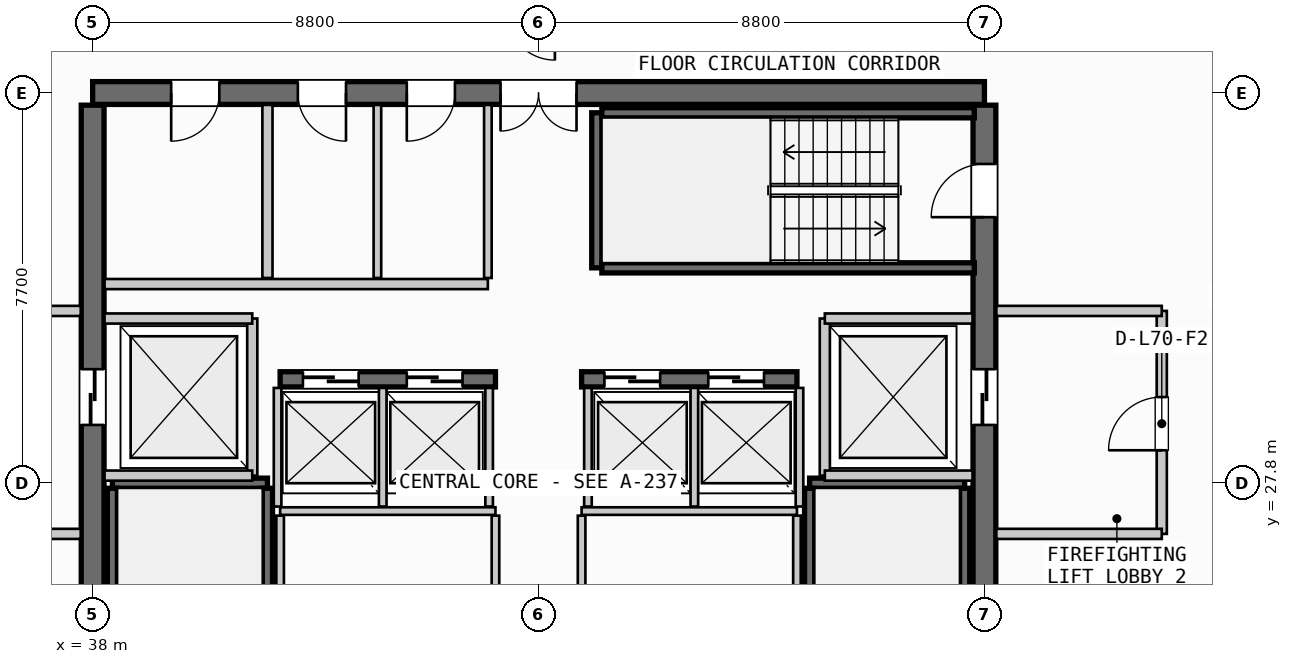
"""IFC4 building model, lengths in metres.
Left out: names, types, materials, properties, quantities, classifications, styles, units other than length and angle.
Written with IfcOpenShell. Run it as: python <this file> out.ifc"""

import sys

from ifc_helpers import new_model, si_unit, direction, frame, frame_2d, origin, place, context, subcontext, project, spatial, rectangle, extrude, source, transform, mapped, element, fill, save


model = new_model("IFC4")
c1 = context("Model", 3, precision=1e-05, world=origin(), true_north=direction((0.0, 1.0)))
c2 = subcontext(c1, "Body", "Model", "MODEL_VIEW")
j1 = project(units=[si_unit("LENGTHUNIT", "METRE"), si_unit("PLANEANGLEUNIT", "RADIAN")], contexts=[c1])
p1 = place(None, origin())
s1 = spatial("IfcSite", under=j1, at=p1, CompositionType="ELEMENT")
p2 = place(p1, origin())
s2 = spatial("IfcBuilding", under=s1, at=p2, CompositionType="ELEMENT")
p3 = place(p2, frame((0.0, 0.0, 266.35)))
s3 = spatial("IfcBuildingStorey", under=s2, at=p3, CompositionType="ELEMENT", Elevation=266.35)
p4 = place(p3, frame((55.6, 35.5, 0.0), z_axis=(0.0, 0.0, 1.0), x_axis=(-1.0, 0.0, 0.0)))
e1 = element("IfcWall", 1, at=p4, inside=s3, PredefinedType="SHEAR", context=c2, shape_type="SweptSolid", body=[
    extrude(rectangle(XDim=17.6, YDim=0.45, at=frame_2d((8.8, 0.0))), origin(), (0.0, 0.0, 1.0), 3.21),
])
p5 = place(p4, frame((8.05, 0.0, 0.0)))
e2 = element("IfcOpeningElement", 2, at=p5, cuts=e1, PredefinedType="OPENING", context=c2, shape_type="SweptSolid", body=[
    extrude(rectangle(XDim=1.5, YDim=2.2, at=frame_2d((0.75, 1.1))), frame((0.0, 0.235, 0.0), z_axis=(0.0, -1.0, 0.0), x_axis=(1.0, 0.0, 0.0)), (0.0, 0.0, 1.0), 0.47),
])
p6 = place(p4, frame((15.1, 0.0, 0.0)))
e3 = element("IfcOpeningElement", 3, at=p6, cuts=e1, PredefinedType="OPENING", context=c2, shape_type="SweptSolid", body=[
    extrude(rectangle(XDim=0.95, YDim=2.15, at=frame_2d((0.475, 1.075))), frame((0.0, 0.235, 0.0), z_axis=(0.0, -1.0, 0.0), x_axis=(1.0, 0.0, 0.0)), (0.0, 0.0, 1.0), 0.47),
])
p7 = place(p4, frame((12.6, 0.0, 0.0)))
e4 = element("IfcOpeningElement", 4, at=p7, cuts=e1, PredefinedType="OPENING", context=c2, shape_type="SweptSolid", body=[
    extrude(rectangle(XDim=0.95, YDim=2.15, at=frame_2d((0.475, 1.075))), frame((0.0, 0.235, 0.0), z_axis=(0.0, -1.0, 0.0), x_axis=(1.0, 0.0, 0.0)), (0.0, 0.0, 1.0), 0.47),
])
p8 = place(p4, frame((10.45, 0.0, 0.0)))
e5 = element("IfcOpeningElement", 5, at=p8, cuts=e1, PredefinedType="OPENING", context=c2, shape_type="SweptSolid", body=[
    extrude(rectangle(XDim=0.95, YDim=2.15, at=frame_2d((0.475, 1.075))), frame((0.0, 0.235, 0.0), z_axis=(0.0, -1.0, 0.0), x_axis=(1.0, 0.0, 0.0)), (0.0, 0.0, 1.0), 0.47),
])
p9 = place(p3, frame((38.0, 35.26, 0.0), z_axis=(0.0, 0.0, 1.0), x_axis=(0.0, -1.0, 0.0)))
e6 = element("IfcWall", 6, at=p9, inside=s3, PredefinedType="SHEAR", context=c2, shape_type="SweptSolid", body=[
    extrude(rectangle(XDim=14.92, YDim=0.45, at=frame_2d((7.46, 0.0))), origin(), (0.0, 0.0, 1.0), 3.21),
])
p10 = place(p9, frame((5.21, 0.0, 0.0)))
e7 = element("IfcOpeningElement", 7, at=p10, cuts=e6, PredefinedType="OPENING", context=c2, shape_type="SweptSolid", body=[
    extrude(rectangle(XDim=1.1, YDim=2.2, at=frame_2d((0.55, 1.1))), frame((0.0, 0.235, 0.0), z_axis=(0.0, -1.0, 0.0), x_axis=(1.0, 0.0, 0.0)), (0.0, 0.0, 1.0), 0.47),
])
p11 = place(p3, frame((55.6, 20.34, 0.0), z_axis=(0.0, 0.0, 1.0), x_axis=(0.0, 1.0, 0.0)))
e8 = element("IfcWall", 8, at=p11, inside=s3, PredefinedType="SHEAR", context=c2, shape_type="SweptSolid", body=[
    extrude(rectangle(XDim=14.92, YDim=0.45, at=frame_2d((7.46, 0.0))), origin(), (0.0, 0.0, 1.0), 3.21),
])
p12 = place(p11, frame((12.71, 0.0, 0.0)))
e9 = element("IfcOpeningElement", 9, at=p12, cuts=e8, PredefinedType="OPENING", context=c2, shape_type="SweptSolid", body=[
    extrude(rectangle(XDim=1.05, YDim=2.15, at=frame_2d((0.525, 1.075))), frame((0.0, 0.235, 0.0), z_axis=(0.0, -1.0, 0.0), x_axis=(1.0, 0.0, 0.0)), (0.0, 0.0, 1.0), 0.47),
])
p13 = place(p11, frame((8.61, 0.0, 0.0)))
e10 = element("IfcOpeningElement", 10, at=p13, cuts=e8, PredefinedType="OPENING", context=c2, shape_type="SweptSolid", body=[
    extrude(rectangle(XDim=1.1, YDim=2.2, at=frame_2d((0.55, 1.1))), frame((0.0, 0.235, 0.0), z_axis=(0.0, -1.0, 0.0), x_axis=(1.0, 0.0, 0.0)), (0.0, 0.0, 1.0), 0.47),
])
p14 = place(p3, frame((41.7, 29.85, 0.0), z_axis=(0.0, 0.0, 1.0), x_axis=(1.0, 0.0, 0.0)))
e11 = element("IfcWall", 11, at=p14, inside=s3, PredefinedType="SHEAR", context=c2, shape_type="SweptSolid", body=[
    extrude(rectangle(XDim=4.25, YDim=0.3, at=frame_2d((2.125, 0.0))), origin(), (0.0, 0.0, 1.0), 3.21),
])
p15 = place(p14, frame((0.45, 0.0, 0.0)))
e12 = element("IfcOpeningElement", 12, at=p15, cuts=e11, PredefinedType="OPENING", context=c2, shape_type="SweptSolid", body=[
    extrude(rectangle(XDim=1.1, YDim=2.2, at=frame_2d((0.55, 1.1))), frame((0.0, 0.16, 0.0), z_axis=(0.0, -1.0, 0.0), x_axis=(1.0, 0.0, 0.0)), (0.0, 0.0, 1.0), 0.32),
])
p16 = place(p14, frame((2.5, 0.0, 0.0)))
e13 = element("IfcOpeningElement", 13, at=p16, cuts=e11, PredefinedType="OPENING", context=c2, shape_type="SweptSolid", body=[
    extrude(rectangle(XDim=1.1, YDim=2.2, at=frame_2d((0.55, 1.1))), frame((0.0, 0.16, 0.0), z_axis=(0.0, -1.0, 0.0), x_axis=(1.0, 0.0, 0.0)), (0.0, 0.0, 1.0), 0.32),
])
p17 = place(p3, frame((47.65, 29.85, 0.0), z_axis=(0.0, 0.0, 1.0), x_axis=(1.0, 0.0, 0.0)))
e14 = element("IfcWall", 14, at=p17, inside=s3, PredefinedType="SHEAR", context=c2, shape_type="SweptSolid", body=[
    extrude(rectangle(XDim=4.25, YDim=0.3, at=frame_2d((2.125, 0.0))), origin(), (0.0, 0.0, 1.0), 3.21),
])
p18 = place(p17, frame((0.45, 0.0, 0.0)))
e15 = element("IfcOpeningElement", 15, at=p18, cuts=e14, PredefinedType="OPENING", context=c2, shape_type="SweptSolid", body=[
    extrude(rectangle(XDim=1.1, YDim=2.2, at=frame_2d((0.55, 1.1))), frame((0.0, 0.16, 0.0), z_axis=(0.0, -1.0, 0.0), x_axis=(1.0, 0.0, 0.0)), (0.0, 0.0, 1.0), 0.32),
])
p19 = place(p17, frame((2.5, 0.0, 0.0)))
e16 = element("IfcOpeningElement", 16, at=p19, cuts=e14, PredefinedType="OPENING", context=c2, shape_type="SweptSolid", body=[
    extrude(rectangle(XDim=1.1, YDim=2.2, at=frame_2d((0.55, 1.1))), frame((0.0, 0.16, 0.0), z_axis=(0.0, -1.0, 0.0), x_axis=(1.0, 0.0, 0.0)), (0.0, 0.0, 1.0), 0.32),
])
p20 = place(p3, frame((38.39, 27.8, 0.0), z_axis=(0.0, 0.0, 1.0), x_axis=(1.0, 0.0, 0.0)))
e17 = element("IfcWall", 17, at=p20, inside=s3, PredefinedType="SHEAR", context=c2, shape_type="SweptSolid", body=[
    extrude(rectangle(XDim=3.06, YDim=0.2, at=frame_2d((1.53, 0.0))), origin(), (0.0, 0.0, 1.0), 3.21),
])
for number, where, z_axis, x_axis in (
    (18, (41.45, 27.7, 0.0), (0.0, 0.0, 1.0), (0.0, -1.0, 0.0)),
    (19, (38.39, 20.35, 0.0), (0.0, 0.0, 1.0), (0.0, 1.0, 0.0)),
):
    element("IfcWall", number, at=place(p3, frame(where, z_axis=z_axis, x_axis=x_axis)), inside=s3, PredefinedType="SHEAR", context=c2, shape_type="SweptSolid", body=[
        extrude(rectangle(XDim=7.35, YDim=0.2, at=frame_2d((3.675, 0.0))), origin(), (0.0, 0.0, 1.0), 3.21),
    ])
p21 = place(p3, frame((52.15, 27.8, 0.0), z_axis=(0.0, 0.0, 1.0), x_axis=(1.0, 0.0, 0.0)))
e20 = element("IfcWall", 20, at=p21, inside=s3, PredefinedType="SHEAR", context=c2, shape_type="SweptSolid", body=[
    extrude(rectangle(XDim=3.06, YDim=0.2, at=frame_2d((1.53, 0.0))), origin(), (0.0, 0.0, 1.0), 3.21),
])
for number, where, z_axis, x_axis in (
    (21, (55.21, 27.7, 0.0), (0.0, 0.0, 1.0), (0.0, -1.0, 0.0)),
    (22, (52.15, 20.35, 0.0), (0.0, 0.0, 1.0), (0.0, 1.0, 0.0)),
):
    element("IfcWall", number, at=place(p3, frame(where, z_axis=z_axis, x_axis=x_axis)), inside=s3, PredefinedType="SHEAR", context=c2, shape_type="SweptSolid", body=[
        extrude(rectangle(XDim=7.35, YDim=0.2, at=frame_2d((3.675, 0.0))), origin(), (0.0, 0.0, 1.0), 3.21),
    ])
p22 = place(p3, frame((47.95, 32.05, 0.0), z_axis=(0.0, 0.0, 1.0), x_axis=(0.0, 1.0, 0.0)))
e23 = element("IfcWall", 23, at=p22, inside=s3, PredefinedType="SHEAR", context=c2, shape_type="SweptSolid", body=[
    extrude(rectangle(XDim=3.06, YDim=0.2, at=frame_2d((1.53, 0.0))), origin(), (0.0, 0.0, 1.0), 3.21),
])
for number, where, z_axis, x_axis in (
    (24, (48.05, 35.11, 0.0), (0.0, 0.0, 1.0), (1.0, 0.0, 0.0)),
    (25, (55.4, 32.05, 0.0), (0.0, 0.0, 1.0), (-1.0, 0.0, 0.0)),
):
    element("IfcWall", number, at=place(p3, frame(where, z_axis=z_axis, x_axis=x_axis)), inside=s3, PredefinedType="SHEAR", context=c2, shape_type="SweptSolid", body=[
        extrude(rectangle(XDim=7.35, YDim=0.2, at=frame_2d((3.675, 0.0))), origin(), (0.0, 0.0, 1.0), 3.21),
    ])
p23 = place(p3, frame((41.15, 27.95, 0.0), z_axis=(0.0, 0.0, 1.0), x_axis=(0.0, 1.0, 0.0)))
e26 = element("IfcWall", 26, at=p23, inside=s3, PredefinedType="PARTITIONING", context=c2, shape_type="SweptSolid", body=[
    extrude(rectangle(XDim=3.1, YDim=0.2, at=frame_2d((1.55, 0.0))), origin(), (0.0, 0.0, 1.0), 2.595),
])
for number, where, z_axis, x_axis in (
    (27, (38.235, 27.95, 0.0), (0.0, 0.0, 1.0), (1.0, 0.0, 0.0)),
    (28, (38.235, 31.05, 0.0), (0.0, 0.0, 1.0), (1.0, 0.0, 0.0)),
):
    element("IfcWall", number, at=place(p3, frame(where, z_axis=z_axis, x_axis=x_axis)), inside=s3, PredefinedType="PARTITIONING", context=c2, shape_type="SweptSolid", body=[
        extrude(rectangle(XDim=2.915, YDim=0.2, at=frame_2d((1.458, 0.0))), origin(), (0.0, 0.0, 1.0), 2.595),
    ])
for number, where, z_axis, x_axis in (
    (29, (34.5, 26.8, 0.0), (0.0, 0.0, 1.0), (1.0, 0.0, 0.0)),
    (30, (34.5, 31.2, 0.0), (0.0, 0.0, 1.0), (1.0, 0.0, 0.0)),
):
    element("IfcWall", number, at=place(p3, frame(where, z_axis=z_axis, x_axis=x_axis)), inside=s3, PredefinedType="PARTITIONING", context=c2, shape_type="SweptSolid", body=[
        extrude(rectangle(XDim=3.265, YDim=0.2, at=frame_2d((1.632, 0.0))), origin(), (0.0, 0.0, 1.0), 2.595),
    ])
p24 = place(p3, frame((52.45, 27.95, 0.0), z_axis=(0.0, 0.0, 1.0), x_axis=(0.0, 1.0, 0.0)))
e31 = element("IfcWall", 31, at=p24, inside=s3, PredefinedType="PARTITIONING", context=c2, shape_type="SweptSolid", body=[
    extrude(rectangle(XDim=3.1, YDim=0.2, at=frame_2d((1.55, 0.0))), origin(), (0.0, 0.0, 1.0), 2.595),
])
for number, where, z_axis, x_axis in (
    (32, (52.45, 27.95, 0.0), (0.0, 0.0, 1.0), (1.0, 0.0, 0.0)),
    (33, (52.45, 31.05, 0.0), (0.0, 0.0, 1.0), (1.0, 0.0, 0.0)),
):
    element("IfcWall", number, at=place(p3, frame(where, z_axis=z_axis, x_axis=x_axis)), inside=s3, PredefinedType="PARTITIONING", context=c2, shape_type="SweptSolid", body=[
        extrude(rectangle(XDim=2.915, YDim=0.2, at=frame_2d((1.458, 0.0))), origin(), (0.0, 0.0, 1.0), 2.595),
    ])
p25 = place(p3, frame((59.1, 26.8, 0.0), z_axis=(0.0, 0.0, 1.0), x_axis=(0.0, 1.0, 0.0)))
e34 = element("IfcWall", 34, at=p25, inside=s3, PredefinedType="PARTITIONING", context=c2, shape_type="SweptSolid", body=[
    extrude(rectangle(XDim=4.4, YDim=0.2, at=frame_2d((2.2, 0.0))), origin(), (0.0, 0.0, 1.0), 2.595),
])
p26 = place(p25, frame((1.65, 0.0, 0.0)))
e35 = element("IfcOpeningElement", 35, at=p26, cuts=e34, PredefinedType="OPENING", context=c2, shape_type="SweptSolid", body=[
    extrude(rectangle(XDim=1.05, YDim=2.15, at=frame_2d((0.525, 1.075))), frame((0.0, 0.11, 0.0), z_axis=(0.0, -1.0, 0.0), x_axis=(1.0, 0.0, 0.0)), (0.0, 0.0, 1.0), 0.22),
])
for number, where, z_axis, x_axis in (
    (36, (55.835, 26.8, 0.0), (0.0, 0.0, 1.0), (1.0, 0.0, 0.0)),
    (37, (55.835, 31.2, 0.0), (0.0, 0.0, 1.0), (1.0, 0.0, 0.0)),
):
    element("IfcWall", number, at=place(p3, frame(where, z_axis=z_axis, x_axis=x_axis)), inside=s3, PredefinedType="PARTITIONING", context=c2, shape_type="SweptSolid", body=[
        extrude(rectangle(XDim=3.265, YDim=0.2, at=frame_2d((1.633, 0.0))), origin(), (0.0, 0.0, 1.0), 2.595),
    ])
for number, where, z_axis, x_axis in (
    (38, (41.7, 27.25, 0.0), (0.0, 0.0, 1.0), (1.0, 0.0, 0.0)),
    (39, (47.65, 27.25, 0.0), (0.0, 0.0, 1.0), (1.0, 0.0, 0.0)),
):
    element("IfcWall", number, at=place(p3, frame(where, z_axis=z_axis, x_axis=x_axis)), inside=s3, PredefinedType="PARTITIONING", context=c2, shape_type="SweptSolid", body=[
        extrude(rectangle(XDim=4.25, YDim=0.15, at=frame_2d((2.125, 0.0))), origin(), (0.0, 0.0, 1.0), 2.595),
    ])
for number, where, z_axis, x_axis in (
    (40, (41.7, 24.92, 0.0), (0.0, 0.0, 1.0), (0.0, 1.0, 0.0)),
    (41, (45.95, 24.92, 0.0), (0.0, 0.0, 1.0), (0.0, 1.0, 0.0)),
    (42, (47.65, 24.92, 0.0), (0.0, 0.0, 1.0), (0.0, 1.0, 0.0)),
    (43, (51.9, 24.92, 0.0), (0.0, 0.0, 1.0), (0.0, 1.0, 0.0)),
):
    element("IfcWall", number, at=place(p3, frame(where, z_axis=z_axis, x_axis=x_axis)), inside=s3, PredefinedType="PARTITIONING", context=c2, shape_type="SweptSolid", body=[
        extrude(rectangle(XDim=2.24, YDim=0.15, at=frame_2d((1.12, 0.0))), origin(), (0.0, 0.0, 1.0), 2.595),
    ])
for number, where, z_axis, x_axis in (
    (44, (41.65, 27.34, 0.0), (0.0, 0.0, 1.0), (0.0, 1.0, 0.0)),
    (45, (43.725, 27.34, 0.0), (0.0, 0.0, 1.0), (0.0, 1.0, 0.0)),
    (46, (45.825, 27.34, 0.0), (0.0, 0.0, 1.0), (0.0, 1.0, 0.0)),
    (47, (47.775, 27.34, 0.0), (0.0, 0.0, 1.0), (0.0, 1.0, 0.0)),
    (48, (49.875, 27.34, 0.0), (0.0, 0.0, 1.0), (0.0, 1.0, 0.0)),
    (49, (51.95, 27.34, 0.0), (0.0, 0.0, 1.0), (0.0, 1.0, 0.0)),
):
    element("IfcWall", number, at=place(p3, frame(where, z_axis=z_axis, x_axis=x_axis)), inside=s3, PredefinedType="PARTITIONING", context=c2, shape_type="SweptSolid", body=[
        extrude(rectangle(XDim=2.34, YDim=0.15, at=frame_2d((1.17, 0.0))), origin(), (0.0, 0.0, 1.0), 2.595),
    ])
p27 = place(p3, frame((41.45, 31.85, 0.0), z_axis=(0.0, 0.0, 1.0), x_axis=(0.0, 1.0, 0.0)))
e50 = element("IfcWall", 50, at=p27, inside=s3, PredefinedType="PARTITIONING", context=c2, shape_type="SweptSolid", body=[
    extrude(rectangle(XDim=3.415, YDim=0.2, at=frame_2d((1.708, 0.0))), origin(), (0.0, 0.0, 1.0), 2.595),
])
p28 = place(p3, frame((38.235, 31.73, 0.0), z_axis=(0.0, 0.0, 1.0), x_axis=(1.0, 0.0, 0.0)))
e51 = element("IfcWall", 51, at=p28, inside=s3, PredefinedType="PARTITIONING", context=c2, shape_type="SweptSolid", body=[
    extrude(rectangle(XDim=7.565, YDim=0.2, at=frame_2d((3.782, 0.0))), origin(), (0.0, 0.0, 1.0), 2.595),
])
p29 = place(p3, frame((45.8, 31.85, 0.0), z_axis=(0.0, 0.0, 1.0), x_axis=(0.0, 1.0, 0.0)))
e52 = element("IfcWall", 52, at=p29, inside=s3, PredefinedType="PARTITIONING", context=c2, shape_type="SweptSolid", body=[
    extrude(rectangle(XDim=3.415, YDim=0.15, at=frame_2d((1.708, 0.0))), origin(), (0.0, 0.0, 1.0), 2.595),
])
p30 = place(p3, frame((43.62, 31.85, 0.0), z_axis=(0.0, 0.0, 1.0), x_axis=(0.0, 1.0, 0.0)))
e53 = element("IfcWall", 53, at=p30, inside=s3, PredefinedType="PLUMBINGWALL", context=c2, shape_type="SweptSolid", body=[
    extrude(rectangle(XDim=3.415, YDim=0.15, at=frame_2d((1.708, 0.0))), origin(), (0.0, 0.0, 1.0), 2.595),
])
m1 = source(origin(), c2, "Body", "SweptSolid", [
    extrude(rectangle(XDim=1.05, YDim=2.15, at=frame_2d((0.525, 1.075))), frame((0.0, 0.025, 0.0), z_axis=(0.0, -1.0, 0.0), x_axis=(1.0, 0.0, 0.0)), (0.0, 0.0, 1.0), 0.05),
])
p31 = place(p12, origin())
e54 = element("IfcDoor", 54, at=p31, inside=s3, OperationType="SINGLE_SWING_LEFT", PredefinedType="DOOR", context=c2, shape_type="MappedRepresentation", body=[
    mapped(m1, transform((0.0, 0.0, 0.0), scale=1.0)),
])
fill(e9, e54)
m2 = source(origin(), c2, "Body", "SweptSolid", [
    extrude(rectangle(XDim=1.5, YDim=2.2, at=frame_2d((0.75, 1.1))), frame((0.0, 0.025, 0.0), z_axis=(0.0, -1.0, 0.0), x_axis=(1.0, 0.0, 0.0)), (0.0, 0.0, 1.0), 0.05),
])
p32 = place(p5, origin())
e55 = element("IfcDoor", 55, at=p32, inside=s3, OperationType="DOUBLE_DOOR_SINGLE_SWING", PredefinedType="DOOR", context=c2, shape_type="MappedRepresentation", body=[
    mapped(m2, transform((0.0, 0.0, 0.0), scale=1.0)),
])
fill(e2, e55)
m3 = source(origin(), c2, "Body", "SweptSolid", [
    extrude(rectangle(XDim=1.1, YDim=2.2, at=frame_2d((0.55, 1.1))), frame((0.0, 0.025, 0.0), z_axis=(0.0, -1.0, 0.0), x_axis=(1.0, 0.0, 0.0)), (0.0, 0.0, 1.0), 0.05),
])
p33 = place(p10, origin())
e56 = element("IfcDoor", 56, at=p33, inside=s3, OperationType="SLIDING_TO_LEFT", PredefinedType="DOOR", context=c2, shape_type="MappedRepresentation", body=[
    mapped(m3, transform((0.0, 0.0, 0.0), scale=1.0)),
])
fill(e7, e56)
p34 = place(p13, origin())
e57 = element("IfcDoor", 57, at=p34, inside=s3, OperationType="SLIDING_TO_RIGHT", PredefinedType="DOOR", context=c2, shape_type="MappedRepresentation", body=[
    mapped(m3, transform((0.0, 0.0, 0.0), scale=1.0)),
])
fill(e10, e57)
p35 = place(p15, origin())
e58 = element("IfcDoor", 58, at=p35, inside=s3, OperationType="SLIDING_TO_LEFT", PredefinedType="DOOR", context=c2, shape_type="MappedRepresentation", body=[
    mapped(m3, transform((0.0, 0.0, 0.0), scale=1.0)),
])
fill(e12, e58)
p36 = place(p16, origin())
e59 = element("IfcDoor", 59, at=p36, inside=s3, OperationType="SLIDING_TO_LEFT", PredefinedType="DOOR", context=c2, shape_type="MappedRepresentation", body=[
    mapped(m3, transform((0.0, 0.0, 0.0), scale=1.0)),
])
fill(e13, e59)
p37 = place(p18, origin())
e60 = element("IfcDoor", 60, at=p37, inside=s3, OperationType="SLIDING_TO_LEFT", PredefinedType="DOOR", context=c2, shape_type="MappedRepresentation", body=[
    mapped(m3, transform((0.0, 0.0, 0.0), scale=1.0)),
])
fill(e15, e60)
p38 = place(p19, origin())
e61 = element("IfcDoor", 61, at=p38, inside=s3, OperationType="SLIDING_TO_LEFT", PredefinedType="DOOR", context=c2, shape_type="MappedRepresentation", body=[
    mapped(m3, transform((0.0, 0.0, 0.0), scale=1.0)),
])
fill(e16, e61)
m4 = source(origin(), c2, "Body", "SweptSolid", [
    extrude(rectangle(XDim=0.95, YDim=2.15, at=frame_2d((0.475, 1.075))), frame((0.0, 0.025, 0.0), z_axis=(0.0, -1.0, 0.0), x_axis=(1.0, 0.0, 0.0)), (0.0, 0.0, 1.0), 0.05),
])
p39 = place(p6, origin())
e62 = element("IfcDoor", 62, at=p39, inside=s3, OperationType="SINGLE_SWING_RIGHT", PredefinedType="DOOR", context=c2, shape_type="MappedRepresentation", body=[
    mapped(m4, transform((0.0, 0.0, 0.0), scale=1.0)),
])
fill(e3, e62)
p40 = place(p7, origin())
e63 = element("IfcDoor", 63, at=p40, inside=s3, OperationType="SINGLE_SWING_LEFT", PredefinedType="DOOR", context=c2, shape_type="MappedRepresentation", body=[
    mapped(m4, transform((0.0, 0.0, 0.0), scale=1.0)),
])
fill(e4, e63)
p41 = place(p8, origin())
e64 = element("IfcDoor", 64, at=p41, inside=s3, OperationType="SINGLE_SWING_RIGHT", PredefinedType="DOOR", context=c2, shape_type="MappedRepresentation", body=[
    mapped(m4, transform((0.0, 0.0, 0.0), scale=1.0)),
])
fill(e5, e64)
p42 = place(p26, origin())
e65 = element("IfcDoor", 65, at=p42, inside=s3, OperationType="SINGLE_SWING_LEFT", PredefinedType="DOOR", context=c2, shape_type="MappedRepresentation", body=[
    mapped(m1, transform((0.0, 0.0, 0.0), scale=1.0)),
])
fill(e35, e65)
save(model, sys.argv[1])
